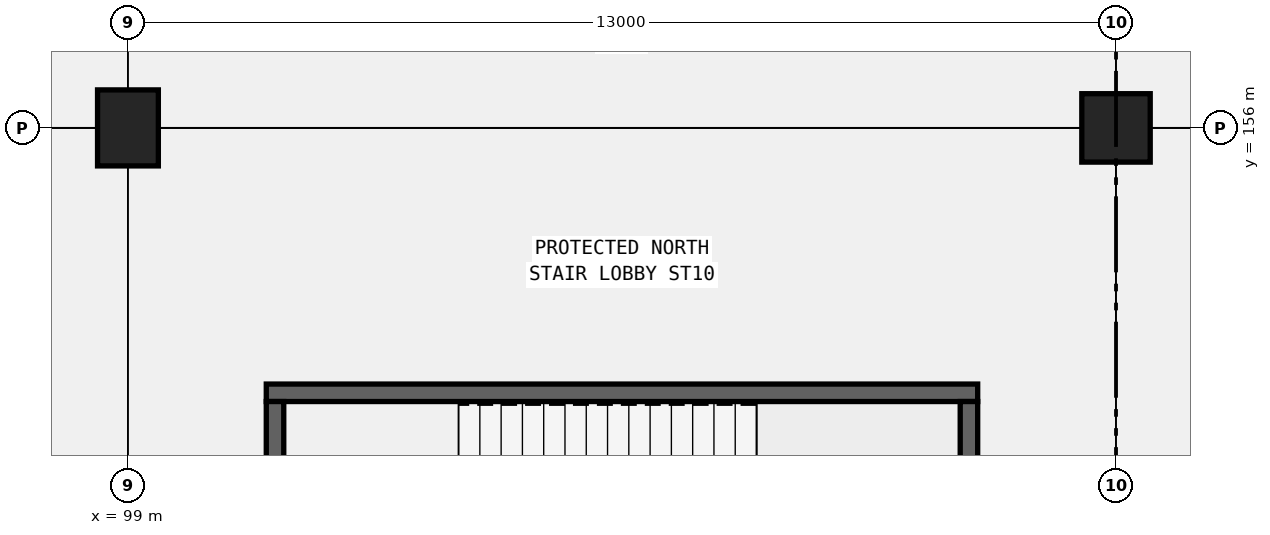
"""IFC4 building model, lengths in metres.
Left out: names, types, materials, properties, quantities, classifications, styles, units other than length and angle.
Written with IfcOpenShell. Run it as: python <this file> out.ifc"""

import sys

from ifc_helpers import new_model, si_unit, direction, frame, frame_2d, origin, origin_2d, place, context, subcontext, project, spatial, rectangle, extrude, element, save


model = new_model("IFC4")
c1 = context("Model", 3, precision=1e-05, world=origin(), true_north=direction((0.0, 1.0)))
c2 = subcontext(c1, "Body", "Model", "MODEL_VIEW")
j1 = project(units=[si_unit("LENGTHUNIT", "METRE"), si_unit("PLANEANGLEUNIT", "RADIAN")], contexts=[c1])
p1 = place(None, origin())
s1 = spatial("IfcSite", under=j1, at=p1, CompositionType="ELEMENT")
p2 = place(p1, origin())
s2 = spatial("IfcBuilding", under=s1, at=p2, CompositionType="ELEMENT")
p3 = place(p2, frame((0.0, 0.0, 5.4)))
s3 = spatial("IfcBuildingStorey", under=s2, at=p3, CompositionType="ELEMENT", Elevation=5.4)
p4 = place(p3, frame((99.0, 156.0, 0.0), z_axis=(0.0, 0.0, 1.0), x_axis=(1.0, 0.0, 0.0)))
e1 = element("IfcColumn", 1, at=p4, inside=s3, PredefinedType="COLUMN", context=c2, shape_type="SweptSolid", body=[
    extrude(rectangle(XDim=0.8, YDim=1.0, at=origin_2d()), origin(), (0.0, 0.0, 1.0), 4.8),
])
p5 = place(p3, frame((112.0, 156.0, 0.0), z_axis=(0.0, 0.0, 1.0), x_axis=(1.0, 0.0, 0.0)))
e2 = element("IfcColumn", 2, at=p5, inside=s3, PredefinedType="COLUMN", context=c2, shape_type="SweptSolid", body=[
    extrude(rectangle(XDim=0.9, YDim=0.9, at=origin_2d()), origin(), (0.0, 0.0, 1.0), 4.8),
])
p6 = place(p3, frame((100.82, 152.515, 0.0), z_axis=(0.0, 0.0, 1.0), x_axis=(1.0, 0.0, 0.0)))
e3 = element("IfcWall", 3, at=p6, inside=s3, PredefinedType="SHEAR", context=c2, shape_type="SweptSolid", body=[
    extrude(rectangle(XDim=9.36, YDim=0.23, at=frame_2d((4.68, 0.0))), origin(), (0.0, 0.0, 1.0), 4.55),
])
for number, where, z_axis, x_axis in (
    (4, (100.935, 147.6, 0.0), (0.0, 0.0, 1.0), (0.0, 1.0, 0.0)),
    (5, (110.065, 147.6, 0.0), (0.0, 0.0, 1.0), (0.0, 1.0, 0.0)),
):
    element("IfcWall", number, at=place(p3, frame(where, z_axis=z_axis, x_axis=x_axis)), inside=s3, PredefinedType="SHEAR", context=c2, shape_type="SweptSolid", body=[
        extrude(rectangle(XDim=4.8, YDim=0.23, at=frame_2d((2.4, 0.0))), origin(), (0.0, 0.0, 1.0), 4.55),
    ])
save(model, sys.argv[1])
